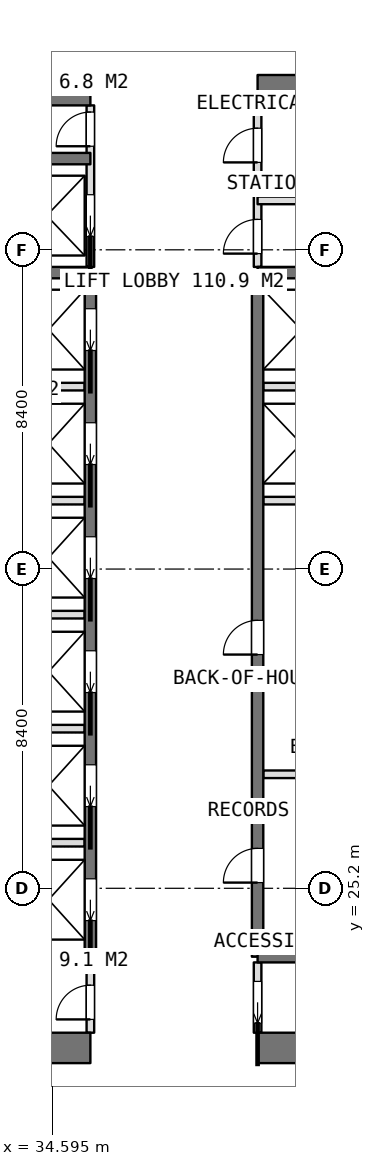
"""IFC4 building model, lengths in metres.
Left out: names, types, materials, properties, quantities, classifications, styles, units other than length and angle.
Written with IfcOpenShell. Run it as: python <this file> out.ifc"""

import sys

from ifc_helpers import new_model, si_unit, direction, frame, frame_2d, origin, place, context, subcontext, project, spatial, rectangle, extrude, element, fill, save


model = new_model("IFC4")
c1 = context("Model", 3, precision=1e-05, world=origin(), true_north=direction((0.0, 1.0)))
c2 = subcontext(c1, "Body", "Model", "MODEL_VIEW")
j1 = project(units=[si_unit("LENGTHUNIT", "METRE"), si_unit("PLANEANGLEUNIT", "RADIAN")], contexts=[c1])
p1 = place(None, origin())
s1 = spatial("IfcSite", under=j1, at=p1, CompositionType="ELEMENT")
p2 = place(p1, origin())
s2 = spatial("IfcBuilding", under=s1, at=p2, CompositionType="ELEMENT")
p3 = place(p2, frame((0.0, 0.0, 280.1)))
s3 = spatial("IfcBuildingStorey", under=s2, at=p3, CompositionType="ELEMENT", Elevation=280.1)
p4 = place(p3, frame((25.2, 21.0, 0.0), z_axis=(0.0, 0.0, 1.0), x_axis=(1.0, 0.0, 0.0)))
e1 = element("IfcWall", 1, at=p4, inside=s3, PredefinedType="SHEAR", context=c2, shape_type="SweptSolid", body=[
    extrude(rectangle(XDim=10.4, YDim=0.8, at=frame_2d((5.2, 0.0))), origin(), (0.0, 0.0, 1.0), 3.75),
])
p5 = place(p3, frame((40.0, 21.0, 0.0), z_axis=(0.0, 0.0, 1.0), x_axis=(1.0, 0.0, 0.0)))
e2 = element("IfcWall", 2, at=p5, inside=s3, PredefinedType="SHEAR", context=c2, shape_type="SweptSolid", body=[
    extrude(rectangle(XDim=10.4, YDim=0.8, at=frame_2d((5.2, 0.0))), origin(), (0.0, 0.0, 1.0), 3.75),
])
p6 = place(p3, frame((25.2, 46.2, 0.0), z_axis=(0.0, 0.0, 1.0), x_axis=(1.0, 0.0, 0.0)))
e3 = element("IfcWall", 3, at=p6, inside=s3, PredefinedType="SHEAR", context=c2, shape_type="SweptSolid", body=[
    extrude(rectangle(XDim=10.4, YDim=0.8, at=frame_2d((5.2, 0.0))), origin(), (0.0, 0.0, 1.0), 3.75),
])
p7 = place(p3, frame((40.0, 46.2, 0.0), z_axis=(0.0, 0.0, 1.0), x_axis=(1.0, 0.0, 0.0)))
e4 = element("IfcWall", 4, at=p7, inside=s3, PredefinedType="SHEAR", context=c2, shape_type="SweptSolid", body=[
    extrude(rectangle(XDim=10.4, YDim=0.8, at=frame_2d((5.2, 0.0))), origin(), (0.0, 0.0, 1.0), 3.75),
])
p8 = place(p3, frame((35.6, 23.4, 0.0), z_axis=(0.0, 0.0, 1.0), x_axis=(0.0, 1.0, 0.0)))
e5 = element("IfcWall", 5, at=p8, inside=s3, PredefinedType="SHEAR", context=c2, shape_type="SweptSolid", body=[
    extrude(rectangle(XDim=18.0, YDim=0.3, at=frame_2d((9.0, 0.0))), origin(), (0.0, 0.0, 1.0), 3.75),
])
p9 = place(p8, frame((0.95, 0.0, 0.0)))
e6 = element("IfcOpeningElement", 6, at=p9, cuts=e5, PredefinedType="OPENING", context=c2, shape_type="SweptSolid", body=[
    extrude(rectangle(XDim=1.1, YDim=2.1, at=frame_2d((0.55, 1.05))), frame((0.0, 0.16, 0.0), z_axis=(0.0, -1.0, 0.0), x_axis=(1.0, 0.0, 0.0)), (0.0, 0.0, 1.0), 0.32),
])
p10 = place(p8, frame((3.95, 0.0, 0.0)))
e7 = element("IfcOpeningElement", 7, at=p10, cuts=e5, PredefinedType="OPENING", context=c2, shape_type="SweptSolid", body=[
    extrude(rectangle(XDim=1.1, YDim=2.1, at=frame_2d((0.55, 1.05))), frame((0.0, 0.16, 0.0), z_axis=(0.0, -1.0, 0.0), x_axis=(1.0, 0.0, 0.0)), (0.0, 0.0, 1.0), 0.32),
])
p11 = place(p8, frame((6.95, 0.0, 0.0)))
e8 = element("IfcOpeningElement", 8, at=p11, cuts=e5, PredefinedType="OPENING", context=c2, shape_type="SweptSolid", body=[
    extrude(rectangle(XDim=1.1, YDim=2.1, at=frame_2d((0.55, 1.05))), frame((0.0, 0.16, 0.0), z_axis=(0.0, -1.0, 0.0), x_axis=(1.0, 0.0, 0.0)), (0.0, 0.0, 1.0), 0.32),
])
p12 = place(p8, frame((9.95, 0.0, 0.0)))
e9 = element("IfcOpeningElement", 9, at=p12, cuts=e5, PredefinedType="OPENING", context=c2, shape_type="SweptSolid", body=[
    extrude(rectangle(XDim=1.1, YDim=2.1, at=frame_2d((0.55, 1.05))), frame((0.0, 0.16, 0.0), z_axis=(0.0, -1.0, 0.0), x_axis=(1.0, 0.0, 0.0)), (0.0, 0.0, 1.0), 0.32),
])
p13 = place(p8, frame((12.95, 0.0, 0.0)))
e10 = element("IfcOpeningElement", 10, at=p13, cuts=e5, PredefinedType="OPENING", context=c2, shape_type="SweptSolid", body=[
    extrude(rectangle(XDim=1.1, YDim=2.1, at=frame_2d((0.55, 1.05))), frame((0.0, 0.16, 0.0), z_axis=(0.0, -1.0, 0.0), x_axis=(1.0, 0.0, 0.0)), (0.0, 0.0, 1.0), 0.32),
])
p14 = place(p8, frame((15.95, 0.0, 0.0)))
e11 = element("IfcOpeningElement", 11, at=p14, cuts=e5, PredefinedType="OPENING", context=c2, shape_type="SweptSolid", body=[
    extrude(rectangle(XDim=1.1, YDim=2.1, at=frame_2d((0.55, 1.05))), frame((0.0, 0.16, 0.0), z_axis=(0.0, -1.0, 0.0), x_axis=(1.0, 0.0, 0.0)), (0.0, 0.0, 1.0), 0.32),
])
p15 = place(p3, frame((40.0, 23.4, 0.0), z_axis=(0.0, 0.0, 1.0), x_axis=(0.0, 1.0, 0.0)))
e12 = element("IfcWall", 12, at=p15, inside=s3, PredefinedType="SHEAR", context=c2, shape_type="SweptSolid", body=[
    extrude(rectangle(XDim=18.0, YDim=0.3, at=frame_2d((9.0, 0.0))), origin(), (0.0, 0.0, 1.0), 3.75),
])
p16 = place(p15, frame((1.95, 0.0, 0.0)))
e13 = element("IfcOpeningElement", 13, at=p16, cuts=e12, PredefinedType="OPENING", context=c2, shape_type="SweptSolid", body=[
    extrude(rectangle(XDim=0.9, YDim=2.1, at=frame_2d((0.45, 1.05))), frame((0.0, 0.16, 0.0), z_axis=(0.0, -1.0, 0.0), x_axis=(1.0, 0.0, 0.0)), (0.0, 0.0, 1.0), 0.32),
])
p17 = place(p15, frame((7.95, 0.0, 0.0)))
e14 = element("IfcOpeningElement", 14, at=p17, cuts=e12, PredefinedType="OPENING", context=c2, shape_type="SweptSolid", body=[
    extrude(rectangle(XDim=0.9, YDim=2.1, at=frame_2d((0.45, 1.05))), frame((0.0, 0.16, 0.0), z_axis=(0.0, -1.0, 0.0), x_axis=(1.0, 0.0, 0.0)), (0.0, 0.0, 1.0), 0.32),
])
for number, where, z_axis, x_axis in (
    (15, (31.8, 23.4, 0.0), (0.0, 0.0, 1.0), (1.0, 0.0, 0.0)),
    (16, (31.8, 41.4, 0.0), (0.0, 0.0, 1.0), (1.0, 0.0, 0.0)),
    (17, (31.8, 44.4, 0.0), (0.0, 0.0, 1.0), (1.0, 0.0, 0.0)),
    (18, (40.0, 23.4, 0.0), (0.0, 0.0, 1.0), (1.0, 0.0, 0.0)),
    (19, (40.0, 41.4, 0.0), (0.0, 0.0, 1.0), (1.0, 0.0, 0.0)),
):
    element("IfcWall", number, at=place(p3, frame(where, z_axis=z_axis, x_axis=x_axis)), inside=s3, PredefinedType="SHEAR", context=c2, shape_type="SweptSolid", body=[
        extrude(rectangle(XDim=3.8, YDim=0.3, at=frame_2d((1.9, 0.0))), origin(), (0.0, 0.0, 1.0), 3.75),
    ])
for number, where, z_axis, x_axis in (
    (20, (31.95, 26.4, 0.0), (0.0, 0.0, 1.0), (1.0, 0.0, 0.0)),
    (21, (31.95, 29.4, 0.0), (0.0, 0.0, 1.0), (1.0, 0.0, 0.0)),
    (22, (31.95, 32.4, 0.0), (0.0, 0.0, 1.0), (1.0, 0.0, 0.0)),
    (23, (31.95, 35.4, 0.0), (0.0, 0.0, 1.0), (1.0, 0.0, 0.0)),
    (24, (31.95, 38.4, 0.0), (0.0, 0.0, 1.0), (1.0, 0.0, 0.0)),
    (25, (40.15, 35.4, 0.0), (0.0, 0.0, 1.0), (1.0, 0.0, 0.0)),
    (26, (40.15, 38.4, 0.0), (0.0, 0.0, 1.0), (1.0, 0.0, 0.0)),
):
    element("IfcWall", number, at=place(p3, frame(where, z_axis=z_axis, x_axis=x_axis)), inside=s3, PredefinedType="PARTITIONING", context=c2, shape_type="SweptSolid", body=[
        extrude(rectangle(XDim=3.5, YDim=0.2, at=frame_2d((1.75, 0.0))), origin(), (0.0, 0.0, 1.0), 3.5),
    ])
p18 = place(p3, frame((40.0, 21.4, 0.0), z_axis=(0.0, 0.0, 1.0), x_axis=(0.0, 1.0, 0.0)))
e27 = element("IfcWall", 27, at=p18, inside=s3, PredefinedType="PARTITIONING", context=c2, shape_type="SweptSolid", body=[
    extrude(rectangle(XDim=1.85, YDim=0.2, at=frame_2d((0.925, 0.0))), origin(), (0.0, 0.0, 1.0), 3.5),
])
p19 = place(p18, frame((0.25, 0.0, 0.0)))
e28 = element("IfcOpeningElement", 28, at=p19, cuts=e27, PredefinedType="OPENING", context=c2, shape_type="SweptSolid", body=[
    extrude(rectangle(XDim=1.1, YDim=2.1, at=frame_2d((0.55, 1.05))), frame((0.0, 0.11, 0.0), z_axis=(0.0, -1.0, 0.0), x_axis=(1.0, 0.0, 0.0)), (0.0, 0.0, 1.0), 0.22),
])
p20 = place(p3, frame((40.0, 41.55, 0.0), z_axis=(0.0, 0.0, 1.0), x_axis=(0.0, 1.0, 0.0)))
e29 = element("IfcWall", 29, at=p20, inside=s3, PredefinedType="PARTITIONING", context=c2, shape_type="SweptSolid", body=[
    extrude(rectangle(XDim=4.25, YDim=0.2, at=frame_2d((2.125, 0.0))), origin(), (0.0, 0.0, 1.0), 3.5),
])
p21 = place(p20, frame((2.75, 0.0, 0.0)))
e30 = element("IfcOpeningElement", 30, at=p21, cuts=e29, PredefinedType="OPENING", context=c2, shape_type="SweptSolid", body=[
    extrude(rectangle(XDim=0.9, YDim=2.1, at=frame_2d((0.45, 1.05))), frame((0.0, 0.11, 0.0), z_axis=(0.0, -1.0, 0.0), x_axis=(1.0, 0.0, 0.0)), (0.0, 0.0, 1.0), 0.22),
])
p22 = place(p20, frame((0.35, 0.0, 0.0)))
e31 = element("IfcOpeningElement", 31, at=p22, cuts=e29, PredefinedType="OPENING", context=c2, shape_type="SweptSolid", body=[
    extrude(rectangle(XDim=0.9, YDim=2.1, at=frame_2d((0.45, 1.05))), frame((0.0, 0.11, 0.0), z_axis=(0.0, -1.0, 0.0), x_axis=(1.0, 0.0, 0.0)), (0.0, 0.0, 1.0), 0.22),
])
p23 = place(p3, frame((35.6, 41.55, 0.0), z_axis=(0.0, 0.0, 1.0), x_axis=(0.0, 1.0, 0.0)))
e32 = element("IfcWall", 32, at=p23, inside=s3, PredefinedType="PARTITIONING", context=c2, shape_type="SweptSolid", body=[
    extrude(rectangle(XDim=4.25, YDim=0.2, at=frame_2d((2.125, 0.0))), origin(), (0.0, 0.0, 1.0), 3.5),
])
p24 = place(p23, frame((3.175, 0.0, 0.0)))
e33 = element("IfcOpeningElement", 33, at=p24, cuts=e32, PredefinedType="OPENING", context=c2, shape_type="SweptSolid", body=[
    extrude(rectangle(XDim=0.9, YDim=2.1, at=frame_2d((0.45, 1.05))), frame((0.0, 0.11, 0.0), z_axis=(0.0, -1.0, 0.0), x_axis=(1.0, 0.0, 0.0)), (0.0, 0.0, 1.0), 0.22),
])
p25 = place(p23, frame((0.8, 0.0, 0.0)))
e34 = element("IfcOpeningElement", 34, at=p25, cuts=e32, PredefinedType="OPENING", context=c2, shape_type="SweptSolid", body=[
    extrude(rectangle(XDim=1.1, YDim=2.1, at=frame_2d((0.55, 1.05))), frame((0.0, 0.11, 0.0), z_axis=(0.0, -1.0, 0.0), x_axis=(1.0, 0.0, 0.0)), (0.0, 0.0, 1.0), 0.22),
])
p26 = place(p3, frame((35.6, 21.4, 0.0), z_axis=(0.0, 0.0, 1.0), x_axis=(0.0, 1.0, 0.0)))
e35 = element("IfcWall", 35, at=p26, inside=s3, PredefinedType="PARTITIONING", context=c2, shape_type="SweptSolid", body=[
    extrude(rectangle(XDim=1.85, YDim=0.2, at=frame_2d((0.925, 0.0))), origin(), (0.0, 0.0, 1.0), 3.5),
])
p27 = place(p26, frame((0.35, 0.0, 0.0)))
e36 = element("IfcOpeningElement", 36, at=p27, cuts=e35, PredefinedType="OPENING", context=c2, shape_type="SweptSolid", body=[
    extrude(rectangle(XDim=0.9, YDim=2.1, at=frame_2d((0.45, 1.05))), frame((0.0, 0.11, 0.0), z_axis=(0.0, -1.0, 0.0), x_axis=(1.0, 0.0, 0.0)), (0.0, 0.0, 1.0), 0.22),
])
p28 = place(p3, frame((40.15, 28.2, 0.0), z_axis=(0.0, 0.0, 1.0), x_axis=(1.0, 0.0, 0.0)))
e37 = element("IfcWall", 37, at=p28, inside=s3, PredefinedType="PARTITIONING", context=c2, shape_type="SweptSolid", body=[
    extrude(rectangle(XDim=3.5, YDim=0.2, at=frame_2d((1.75, 0.0))), origin(), (0.0, 0.0, 1.0), 3.5),
])
p29 = place(p3, frame((40.0, 43.3, 0.0), z_axis=(0.0, 0.0, 1.0), x_axis=(1.0, 0.0, 0.0)))
e38 = element("IfcWall", 38, at=p29, inside=s3, PredefinedType="PARTITIONING", context=c2, shape_type="SweptSolid", body=[
    extrude(rectangle(XDim=3.65, YDim=0.2, at=frame_2d((1.825, 0.0))), origin(), (0.0, 0.0, 1.0), 3.5),
])
p30 = place(p19, origin())
e39 = element("IfcDoor", 39, at=p30, inside=s3, OperationType="SLIDING_TO_LEFT", PredefinedType="DOOR", context=c2, shape_type="SweptSolid", body=[
    extrude(rectangle(XDim=1.1, YDim=2.1, at=frame_2d((0.55, 1.05))), frame((0.0, 0.025, 0.0), z_axis=(0.0, -1.0, 0.0), x_axis=(1.0, 0.0, 0.0)), (0.0, 0.0, 1.0), 0.05),
])
fill(e28, e39)
p31 = place(p27, origin())
e40 = element("IfcDoor", 40, at=p31, inside=s3, OperationType="SINGLE_SWING_LEFT", PredefinedType="DOOR", context=c2, shape_type="SweptSolid", body=[
    extrude(rectangle(XDim=0.9, YDim=2.1, at=frame_2d((0.45, 1.05))), frame((0.0, 0.025, 0.0), z_axis=(0.0, -1.0, 0.0), x_axis=(1.0, 0.0, 0.0)), (0.0, 0.0, 1.0), 0.05),
])
fill(e36, e40)
p32 = place(p21, origin())
e41 = element("IfcDoor", 41, at=p32, inside=s3, OperationType="SINGLE_SWING_LEFT", PredefinedType="DOOR", context=c2, shape_type="SweptSolid", body=[
    extrude(rectangle(XDim=0.9, YDim=2.1, at=frame_2d((0.45, 1.05))), frame((0.0, 0.025, 0.0), z_axis=(0.0, -1.0, 0.0), x_axis=(1.0, 0.0, 0.0)), (0.0, 0.0, 1.0), 0.05),
])
fill(e30, e41)
p33 = place(p22, origin())
e42 = element("IfcDoor", 42, at=p33, inside=s3, OperationType="SINGLE_SWING_LEFT", PredefinedType="DOOR", context=c2, shape_type="SweptSolid", body=[
    extrude(rectangle(XDim=0.9, YDim=2.1, at=frame_2d((0.45, 1.05))), frame((0.0, 0.025, 0.0), z_axis=(0.0, -1.0, 0.0), x_axis=(1.0, 0.0, 0.0)), (0.0, 0.0, 1.0), 0.05),
])
fill(e31, e42)
p34 = place(p16, origin())
e43 = element("IfcDoor", 43, at=p34, inside=s3, OperationType="SINGLE_SWING_LEFT", PredefinedType="DOOR", context=c2, shape_type="SweptSolid", body=[
    extrude(rectangle(XDim=0.9, YDim=2.1, at=frame_2d((0.45, 1.05))), frame((0.0, 0.025, 0.0), z_axis=(0.0, -1.0, 0.0), x_axis=(1.0, 0.0, 0.0)), (0.0, 0.0, 1.0), 0.05),
])
fill(e13, e43)
p35 = place(p17, origin())
e44 = element("IfcDoor", 44, at=p35, inside=s3, OperationType="SINGLE_SWING_LEFT", PredefinedType="DOOR", context=c2, shape_type="SweptSolid", body=[
    extrude(rectangle(XDim=0.9, YDim=2.1, at=frame_2d((0.45, 1.05))), frame((0.0, 0.025, 0.0), z_axis=(0.0, -1.0, 0.0), x_axis=(1.0, 0.0, 0.0)), (0.0, 0.0, 1.0), 0.05),
])
fill(e14, e44)
p36 = place(p24, origin())
e45 = element("IfcDoor", 45, at=p36, inside=s3, OperationType="SINGLE_SWING_LEFT", PredefinedType="DOOR", context=c2, shape_type="SweptSolid", body=[
    extrude(rectangle(XDim=0.9, YDim=2.1, at=frame_2d((0.45, 1.05))), frame((0.0, 0.025, 0.0), z_axis=(0.0, -1.0, 0.0), x_axis=(1.0, 0.0, 0.0)), (0.0, 0.0, 1.0), 0.05),
])
fill(e33, e45)
p37 = place(p9, origin())
e46 = element("IfcDoor", 46, at=p37, inside=s3, OperationType="SLIDING_TO_LEFT", PredefinedType="USERDEFINED", context=c2, shape_type="SweptSolid", body=[
    extrude(rectangle(XDim=1.1, YDim=2.1, at=frame_2d((0.55, 1.05))), frame((0.0, 0.025, 0.0), z_axis=(0.0, -1.0, 0.0), x_axis=(1.0, 0.0, 0.0)), (0.0, 0.0, 1.0), 0.05),
])
fill(e6, e46)
p38 = place(p10, origin())
e47 = element("IfcDoor", 47, at=p38, inside=s3, OperationType="SLIDING_TO_LEFT", PredefinedType="USERDEFINED", context=c2, shape_type="SweptSolid", body=[
    extrude(rectangle(XDim=1.1, YDim=2.1, at=frame_2d((0.55, 1.05))), frame((0.0, 0.025, 0.0), z_axis=(0.0, -1.0, 0.0), x_axis=(1.0, 0.0, 0.0)), (0.0, 0.0, 1.0), 0.05),
])
fill(e7, e47)
p39 = place(p11, origin())
e48 = element("IfcDoor", 48, at=p39, inside=s3, OperationType="SLIDING_TO_LEFT", PredefinedType="USERDEFINED", context=c2, shape_type="SweptSolid", body=[
    extrude(rectangle(XDim=1.1, YDim=2.1, at=frame_2d((0.55, 1.05))), frame((0.0, 0.025, 0.0), z_axis=(0.0, -1.0, 0.0), x_axis=(1.0, 0.0, 0.0)), (0.0, 0.0, 1.0), 0.05),
])
fill(e8, e48)
p40 = place(p12, origin())
e49 = element("IfcDoor", 49, at=p40, inside=s3, OperationType="SLIDING_TO_LEFT", PredefinedType="USERDEFINED", context=c2, shape_type="SweptSolid", body=[
    extrude(rectangle(XDim=1.1, YDim=2.1, at=frame_2d((0.55, 1.05))), frame((0.0, 0.025, 0.0), z_axis=(0.0, -1.0, 0.0), x_axis=(1.0, 0.0, 0.0)), (0.0, 0.0, 1.0), 0.05),
])
fill(e9, e49)
p41 = place(p13, origin())
e50 = element("IfcDoor", 50, at=p41, inside=s3, OperationType="SLIDING_TO_LEFT", PredefinedType="USERDEFINED", context=c2, shape_type="SweptSolid", body=[
    extrude(rectangle(XDim=1.1, YDim=2.1, at=frame_2d((0.55, 1.05))), frame((0.0, 0.025, 0.0), z_axis=(0.0, -1.0, 0.0), x_axis=(1.0, 0.0, 0.0)), (0.0, 0.0, 1.0), 0.05),
])
fill(e10, e50)
p42 = place(p14, origin())
e51 = element("IfcDoor", 51, at=p42, inside=s3, OperationType="SLIDING_TO_LEFT", PredefinedType="USERDEFINED", context=c2, shape_type="SweptSolid", body=[
    extrude(rectangle(XDim=1.1, YDim=2.1, at=frame_2d((0.55, 1.05))), frame((0.0, 0.025, 0.0), z_axis=(0.0, -1.0, 0.0), x_axis=(1.0, 0.0, 0.0)), (0.0, 0.0, 1.0), 0.05),
])
fill(e11, e51)
p43 = place(p25, origin())
e52 = element("IfcDoor", 52, at=p43, inside=s3, OperationType="SLIDING_TO_LEFT", PredefinedType="USERDEFINED", context=c2, shape_type="SweptSolid", body=[
    extrude(rectangle(XDim=1.1, YDim=2.1, at=frame_2d((0.55, 1.05))), frame((0.0, 0.025, 0.0), z_axis=(0.0, -1.0, 0.0), x_axis=(1.0, 0.0, 0.0)), (0.0, 0.0, 1.0), 0.05),
])
fill(e34, e52)
save(model, sys.argv[1])
